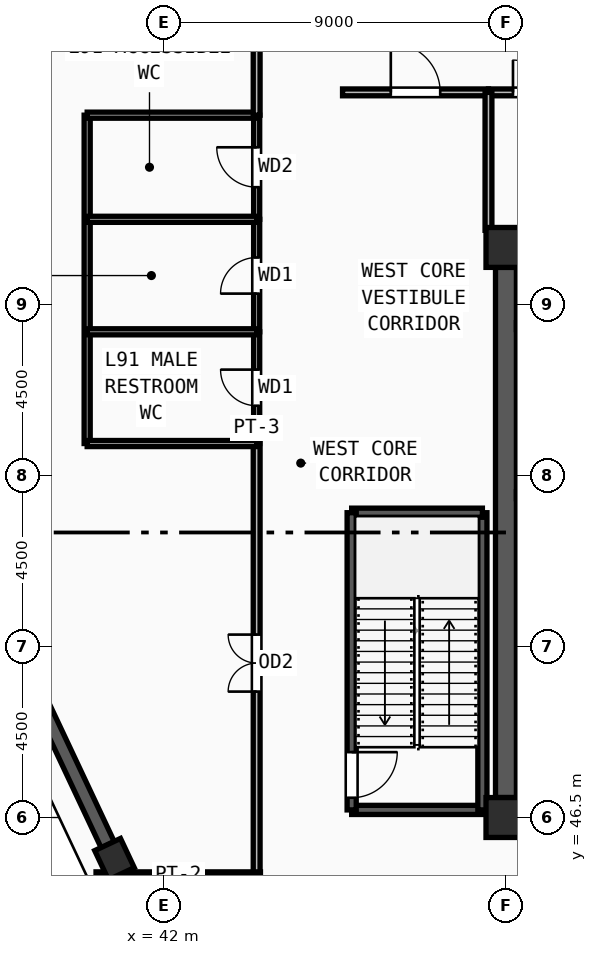
"""IFC4 building model, lengths in metres.
Left out: names, types, materials, properties, quantities, classifications, styles, units other than length and angle.
Written with IfcOpenShell. Run it as: python <this file> out.ifc"""

import sys

from ifc_helpers import new_model, si_unit, direction, frame, frame_2d, origin, origin_2d, place, context, subcontext, project, spatial, rectangle, extrude, source, transform, mapped, element, fill, save


model = new_model("IFC4")
c1 = context("Model", 3, precision=1e-05, world=origin(), true_north=direction((0.0, 1.0)))
c2 = subcontext(c1, "Body", "Model", "MODEL_VIEW")
j1 = project(units=[si_unit("LENGTHUNIT", "METRE"), si_unit("PLANEANGLEUNIT", "RADIAN")], contexts=[c1])
p1 = place(None, origin())
s1 = spatial("IfcSite", under=j1, at=p1, CompositionType="ELEMENT")
p2 = place(p1, origin())
s2 = spatial("IfcBuilding", under=s1, at=p2, CompositionType="ELEMENT")
p3 = place(p2, frame((0.0, 0.0, 351.0)))
s3 = spatial("IfcBuildingStorey", under=s2, at=p3, CompositionType="ELEMENT", Elevation=351.0)
m1 = source(origin(), c2, "Body", "SweptSolid", [
    extrude(rectangle(XDim=1.05, YDim=1.05, at=origin_2d()), origin(), (0.0, 0.0, 1.0), 4.8),
])
for number, where, z_axis, x_axis in (
    (1, (51.0, 46.5, 0.0), (0.0, 0.0, 1.0), (1.0, 0.0, 0.0)),
    (2, (51.0, 61.5, 0.0), (0.0, 0.0, 1.0), (1.0, 0.0, 0.0)),
):
    element("IfcColumn", number, at=place(p3, frame(where, z_axis=z_axis, x_axis=x_axis)), inside=s3, PredefinedType="COLUMN", context=c2, shape_type="MappedRepresentation", body=[
        mapped(m1, transform((0.0, 0.0, 0.0), x_axis=(1.0, 0.0, 0.0), y_axis=(0.0, 1.0, 0.0), z_axis=(0.0, 0.0, 1.0), scale=1.0)),
    ])
m2 = source(origin(), c2, "Body", "SweptSolid", [
    extrude(rectangle(XDim=0.85, YDim=0.75, at=origin_2d()), origin(), (0.0, 0.0, 1.0), 4.8),
])
p4 = place(p3, frame((40.699, 45.405, 0.0), z_axis=(0.0, 0.0, 1.0), x_axis=(-0.425937207192, 0.90475272618, 0.0)))
e3 = element("IfcColumn", 3, at=p4, inside=s3, PredefinedType="COLUMN", context=c2, shape_type="MappedRepresentation", body=[
    mapped(m2, transform((0.0, 0.0, 0.0), x_axis=(1.0, 0.0, 0.0), y_axis=(0.0, 1.0, 0.0), z_axis=(0.0, 0.0, 1.0), scale=1.0)),
])
p5 = place(p3, frame((38.526, 50.02, 0.0), z_axis=(0.0, 0.0, 1.0), x_axis=(0.425937528266, -0.904752575025, 0.0)))
e4 = element("IfcWall", 4, at=p5, inside=s3, PredefinedType="SOLIDWALL", context=c2, shape_type="SweptSolid", body=[
    extrude(rectangle(XDim=4.686, YDim=0.38, at=frame_2d((2.343, 0.0))), origin(), (0.0, 0.0, 1.0), 4.52),
])
p6 = place(p3, frame((40.931, 45.061, 0.0), z_axis=(0.0, 0.0, 1.0), x_axis=(0.559190389006, -0.829039268578, 0.0)))
e5 = element("IfcWall", 5, at=p6, inside=s3, PredefinedType="SOLIDWALL", context=c2, shape_type="SweptSolid", body=[
    extrude(rectangle(XDim=6.889, YDim=0.38, at=frame_2d((3.444, 0.0))), origin(), (0.0, 0.0, 1.0), 4.52),
])
p7 = place(p3, frame((51.0, 47.025, 0.0), z_axis=(0.0, 0.0, 1.0), x_axis=(0.0, 1.0, 0.0)))
e6 = element("IfcWall", 6, at=p7, inside=s3, PredefinedType="SHEAR", context=c2, shape_type="SweptSolid", body=[
    extrude(rectangle(XDim=13.95, YDim=0.55, at=frame_2d((6.975, 0.0))), origin(), (0.0, 0.0, 1.0), 4.52),
])
p8 = place(p3, frame((46.94, 46.7, 0.0), z_axis=(0.0, 0.0, 1.0), x_axis=(1.0, 0.0, 0.0)))
e7 = element("IfcWall", 7, at=p8, inside=s3, PredefinedType="SOLIDWALL", context=c2, shape_type="SweptSolid", body=[
    extrude(rectangle(XDim=3.44, YDim=0.24, at=frame_2d((1.72, 0.0))), origin(), (0.0, 0.0, 1.0), 4.52),
])
p9 = place(p3, frame((50.38, 46.7, 0.0), z_axis=(0.0, 0.0, 1.0), x_axis=(0.0, 1.0, 0.0)))
e8 = element("IfcWall", 8, at=p9, inside=s3, PredefinedType="SOLIDWALL", context=c2, shape_type="SweptSolid", body=[
    extrude(rectangle(XDim=7.82, YDim=0.24, at=frame_2d((3.91, 0.0))), origin(), (0.0, 0.0, 1.0), 4.52),
])
p10 = place(p3, frame((50.38, 54.52, 0.0), z_axis=(0.0, 0.0, 1.0), x_axis=(-1.0, 0.0, 0.0)))
e9 = element("IfcWall", 9, at=p10, inside=s3, PredefinedType="SOLIDWALL", context=c2, shape_type="SweptSolid", body=[
    extrude(rectangle(XDim=3.44, YDim=0.24, at=frame_2d((1.72, 0.0))), origin(), (0.0, 0.0, 1.0), 4.52),
])
p11 = place(p3, frame((46.94, 54.52, 0.0), z_axis=(0.0, 0.0, 1.0), x_axis=(0.0, -1.0, 0.0)))
e10 = element("IfcWall", 10, at=p11, inside=s3, PredefinedType="SOLIDWALL", context=c2, shape_type="SweptSolid", body=[
    extrude(rectangle(XDim=7.82, YDim=0.24, at=frame_2d((3.91, 0.0))), origin(), (0.0, 0.0, 1.0), 4.52),
])
m3 = source(origin(), c2, "Body", "SweptSolid", [
    extrude(rectangle(XDim=1.2, YDim=2.2, at=frame_2d((0.6, 1.1))), frame((0.0, 0.13, 0.0), z_axis=(0.0, -1.0, 0.0), x_axis=(1.0, 0.0, 0.0)), (0.0, 0.0, 1.0), 0.26),
])
p12 = place(p11, frame((6.3, 0.0, 0.0)))
e11 = element("IfcOpeningElement", 11, at=p12, cuts=e10, PredefinedType="OPENING", context=c2, shape_type="MappedRepresentation", body=[
    mapped(m3, transform((0.0, 0.0, 0.0), x_axis=(1.0, 0.0, 0.0), y_axis=(0.0, 1.0, 0.0), z_axis=(0.0, 0.0, 1.0), scale=1.0)),
])
p13 = place(p3, frame((51.275, 54.98, 0.0), z_axis=(0.0, 0.0, 1.0), x_axis=(1.0, 0.0, 0.0)))
e12 = element("IfcWall", 12, at=p13, inside=s3, PredefinedType="PARTITIONING", context=c2, shape_type="SweptSolid", body=[
    extrude(rectangle(XDim=2.485, YDim=0.18, at=frame_2d((1.243, 0.0))), origin(), (0.0, 0.0, 1.0), 4.52),
])
m4 = source(origin(), c2, "Body", "SweptSolid", [
    extrude(rectangle(XDim=0.85, YDim=2.1, at=frame_2d((0.425, 1.05))), frame((0.0, 0.1, 0.0), z_axis=(0.0, -1.0, 0.0), x_axis=(1.0, 0.0, 0.0)), (0.0, 0.0, 1.0), 0.2),
])
p14 = place(p13, frame((0.915, 0.0, 0.0)))
e13 = element("IfcOpeningElement", 13, at=p14, cuts=e12, PredefinedType="OPENING", context=c2, shape_type="MappedRepresentation", body=[
    mapped(m4, transform((0.0, 0.0, 0.0), x_axis=(1.0, 0.0, 0.0), y_axis=(0.0, 1.0, 0.0), z_axis=(0.0, 0.0, 1.0), scale=1.0)),
])
p15 = place(p3, frame((44.44, 56.34, 0.0), z_axis=(0.0, 0.0, 1.0), x_axis=(0.0, 1.0, 0.0)))
e14 = element("IfcWall", 14, at=p15, inside=s3, PredefinedType="PARTITIONING", context=c2, shape_type="SweptSolid", body=[
    extrude(rectangle(XDim=2.94, YDim=0.16, at=frame_2d((1.47, 0.0))), origin(), (0.0, 0.0, 1.0), 4.52),
])
m5 = source(origin(), c2, "Body", "SweptSolid", [
    extrude(rectangle(XDim=0.95, YDim=2.15, at=frame_2d((0.475, 1.075))), frame((0.0, 0.09, 0.0), z_axis=(0.0, -1.0, 0.0), x_axis=(1.0, 0.0, 0.0)), (0.0, 0.0, 1.0), 0.18),
])
p16 = place(p15, frame((0.995, 0.0, 0.0)))
e15 = element("IfcOpeningElement", 15, at=p16, cuts=e14, PredefinedType="OPENING", context=c2, shape_type="MappedRepresentation", body=[
    mapped(m5, transform((0.0, 0.0, 0.0), x_axis=(1.0, 0.0, 0.0), y_axis=(0.0, 1.0, 0.0), z_axis=(0.0, 0.0, 1.0), scale=1.0)),
])
p17 = place(p3, frame((44.44, 59.28, 0.0), z_axis=(0.0, 0.0, 1.0), x_axis=(0.0, 1.0, 0.0)))
e16 = element("IfcWall", 16, at=p17, inside=s3, PredefinedType="PARTITIONING", context=c2, shape_type="SweptSolid", body=[
    extrude(rectangle(XDim=2.96, YDim=0.16, at=frame_2d((1.48, 0.0))), origin(), (0.0, 0.0, 1.0), 4.52),
])
p18 = place(p17, frame((1.005, 0.0, 0.0)))
e17 = element("IfcOpeningElement", 17, at=p18, cuts=e16, PredefinedType="OPENING", context=c2, shape_type="MappedRepresentation", body=[
    mapped(m5, transform((0.0, 0.0, 0.0), x_axis=(1.0, 0.0, 0.0), y_axis=(0.0, 1.0, 0.0), z_axis=(0.0, 0.0, 1.0), scale=1.0)),
])
p19 = place(p3, frame((44.44, 62.24, 0.0), z_axis=(0.0, 0.0, 1.0), x_axis=(0.0, 1.0, 0.0)))
e18 = element("IfcWall", 18, at=p19, inside=s3, PredefinedType="PARTITIONING", context=c2, shape_type="SweptSolid", body=[
    extrude(rectangle(XDim=2.74, YDim=0.16, at=frame_2d((1.37, 0.0))), origin(), (0.0, 0.0, 1.0), 4.52),
])
m6 = source(origin(), c2, "Body", "SweptSolid", [
    extrude(rectangle(XDim=1.05, YDim=2.15, at=frame_2d((0.525, 1.075))), frame((0.0, 0.09, 0.0), z_axis=(0.0, -1.0, 0.0), x_axis=(1.0, 0.0, 0.0)), (0.0, 0.0, 1.0), 0.18),
])
p20 = place(p19, frame((0.845, 0.0, 0.0)))
e19 = element("IfcOpeningElement", 19, at=p20, cuts=e18, PredefinedType="OPENING", context=c2, shape_type="MappedRepresentation", body=[
    mapped(m6, transform((0.0, 0.0, 0.0), x_axis=(1.0, 0.0, 0.0), y_axis=(0.0, 1.0, 0.0), z_axis=(0.0, 0.0, 1.0), scale=1.0)),
])
p21 = place(p3, frame((50.54, 65.58, 0.0), z_axis=(0.0, 0.0, 1.0), x_axis=(1.0, 0.0, 0.0)))
e20 = element("IfcWall", 20, at=p21, inside=s3, PredefinedType="PARTITIONING", context=c2, shape_type="SweptSolid", body=[
    extrude(rectangle(XDim=2.14, YDim=0.18, at=frame_2d((1.07, 0.0))), origin(), (0.0, 0.0, 1.0), 4.52),
])
p22 = place(p21, frame((0.645, 0.0, 0.0)))
e21 = element("IfcOpeningElement", 21, at=p22, cuts=e20, PredefinedType="OPENING", context=c2, shape_type="MappedRepresentation", body=[
    mapped(m4, transform((0.0, 0.0, 0.0), x_axis=(1.0, 0.0, 0.0), y_axis=(0.0, 1.0, 0.0), z_axis=(0.0, 0.0, 1.0), scale=1.0)),
])
p23 = place(p3, frame((46.7, 65.58, 0.0), z_axis=(0.0, 0.0, 1.0), x_axis=(1.0, 0.0, 0.0)))
e22 = element("IfcWall", 22, at=p23, inside=s3, PredefinedType="PARTITIONING", context=c2, shape_type="SweptSolid", body=[
    extrude(rectangle(XDim=3.84, YDim=0.18, at=frame_2d((1.92, 0.0))), origin(), (0.0, 0.0, 1.0), 4.52),
])
m7 = source(origin(), c2, "Body", "SweptSolid", [
    extrude(rectangle(XDim=1.3, YDim=2.2, at=frame_2d((0.65, 1.1))), frame((0.0, 0.1, 0.0), z_axis=(0.0, -1.0, 0.0), x_axis=(1.0, 0.0, 0.0)), (0.0, 0.0, 1.0), 0.2),
])
p24 = place(p23, frame((1.27, 0.0, 0.0)))
e23 = element("IfcOpeningElement", 23, at=p24, cuts=e22, PredefinedType="OPENING", context=c2, shape_type="MappedRepresentation", body=[
    mapped(m7, transform((0.0, 0.0, 0.0), x_axis=(1.0, 0.0, 0.0), y_axis=(0.0, 1.0, 0.0), z_axis=(0.0, 0.0, 1.0), scale=1.0)),
])
p25 = place(p3, frame((44.44, 44.785, 0.0), z_axis=(0.0, 0.0, 1.0), x_axis=(0.0, 1.0, 0.0)))
e24 = element("IfcWall", 24, at=p25, inside=s3, PredefinedType="PARTITIONING", context=c2, shape_type="SweptSolid", body=[
    extrude(rectangle(XDim=11.555, YDim=0.18, at=frame_2d((5.778, 0.0))), origin(), (0.0, 0.0, 1.0), 4.155),
])
m8 = source(origin(), c2, "Body", "SweptSolid", [
    extrude(rectangle(XDim=1.5, YDim=2.2, at=frame_2d((0.75, 1.1))), frame((0.0, 0.1, 0.0), z_axis=(0.0, -1.0, 0.0), x_axis=(1.0, 0.0, 0.0)), (0.0, 0.0, 1.0), 0.2),
])
p26 = place(p25, frame((5.028, 0.0, 0.0)))
e25 = element("IfcOpeningElement", 25, at=p26, cuts=e24, PredefinedType="OPENING", context=c2, shape_type="MappedRepresentation", body=[
    mapped(m8, transform((0.0, 0.0, 0.0), x_axis=(1.0, 0.0, 0.0), y_axis=(0.0, 1.0, 0.0), z_axis=(0.0, 0.0, 1.0), scale=1.0)),
])
p27 = place(p3, frame((51.275, 59.43, 0.0), z_axis=(0.0, 0.0, 1.0), x_axis=(1.0, 0.0, 0.0)))
e26 = element("IfcWall", 26, at=p27, inside=s3, PredefinedType="PARTITIONING", context=c2, shape_type="SweptSolid", body=[
    extrude(rectangle(XDim=2.505, YDim=0.18, at=frame_2d((1.252, 0.0))), origin(), (0.0, 0.0, 1.0), 4.52),
])
p28 = place(p3, frame((39.98, 56.34, 0.0), z_axis=(0.0, 0.0, 1.0), x_axis=(0.0, 1.0, 0.0)))
e27 = element("IfcWall", 27, at=p28, inside=s3, PredefinedType="PARTITIONING", context=c2, shape_type="SweptSolid", body=[
    extrude(rectangle(XDim=8.64, YDim=0.16, at=frame_2d((4.32, 0.0))), origin(), (0.0, 0.0, 1.0), 4.52),
])
for number, where, z_axis, x_axis in (
    (28, (39.98, 56.34, 0.0), (0.0, 0.0, 1.0), (1.0, 0.0, 0.0)),
    (29, (39.98, 59.28, 0.0), (0.0, 0.0, 1.0), (1.0, 0.0, 0.0)),
    (30, (39.98, 62.24, 0.0), (0.0, 0.0, 1.0), (1.0, 0.0, 0.0)),
    (31, (39.98, 64.98, 0.0), (0.0, 0.0, 1.0), (1.0, 0.0, 0.0)),
):
    element("IfcWall", number, at=place(p3, frame(where, z_axis=z_axis, x_axis=x_axis)), inside=s3, PredefinedType="PARTITIONING", context=c2, shape_type="SweptSolid", body=[
        extrude(rectangle(XDim=4.46, YDim=0.16, at=frame_2d((2.23, 0.0))), origin(), (0.0, 0.0, 1.0), 4.52),
    ])
p29 = place(p3, frame((50.54, 61.95, 0.0), z_axis=(0.0, 0.0, 1.0), x_axis=(0.0, 1.0, 0.0)))
e32 = element("IfcWall", 32, at=p29, inside=s3, PredefinedType="PARTITIONING", context=c2, shape_type="SweptSolid", body=[
    extrude(rectangle(XDim=3.63, YDim=0.18, at=frame_2d((1.815, 0.0))), origin(), (0.0, 0.0, 1.0), 4.52),
])
p30 = place(p3, frame((44.44, 64.98, 0.0), z_axis=(0.0, 0.0, 1.0), x_axis=(0.0, 1.0, 0.0)))
e33 = element("IfcWall", 33, at=p30, inside=s3, PredefinedType="PARTITIONING", context=c2, shape_type="SweptSolid", body=[
    extrude(rectangle(XDim=3.0, YDim=0.18, at=frame_2d((1.5, 0.0))), origin(), (0.0, 0.0, 1.0), 4.52),
])
p31 = place(p3, frame((44.54, 45.0, 0.0), z_axis=(0.0, 0.0, 1.0), x_axis=(-1.0, 0.0, 0.0)))
e34 = element("IfcWall", 34, at=p31, inside=s3, PredefinedType="PARTITIONING", context=c2, shape_type="SweptSolid", body=[
    extrude(rectangle(XDim=4.327, YDim=0.14, at=frame_2d((2.164, 0.0))), origin(), (0.0, 0.0, 1.0), 4.52),
])
m9 = source(origin(), c2, "Body", "SweptSolid", [
    extrude(rectangle(XDim=1.2, YDim=2.2, at=frame_2d((0.6, 1.1))), frame((0.0, 0.025, 0.0), z_axis=(0.0, -1.0, 0.0), x_axis=(1.0, 0.0, 0.0)), (0.0, 0.0, 1.0), 0.05),
])
p32 = place(p12, origin())
e35 = element("IfcDoor", 35, at=p32, inside=s3, OperationType="SINGLE_SWING_LEFT", PredefinedType="DOOR", context=c2, shape_type="MappedRepresentation", body=[
    mapped(m9, transform((0.0, 0.0, 0.0), x_axis=(1.0, 0.0, 0.0), y_axis=(0.0, 1.0, 0.0), z_axis=(0.0, 0.0, 1.0), scale=1.0)),
])
fill(e11, e35)
m10 = source(origin(), c2, "Body", "SweptSolid", [
    extrude(rectangle(XDim=0.95, YDim=2.15, at=frame_2d((0.475, 1.075))), frame((0.0, 0.025, 0.0), z_axis=(0.0, -1.0, 0.0), x_axis=(1.0, 0.0, 0.0)), (0.0, 0.0, 1.0), 0.05),
])
p33 = place(p16, origin())
e36 = element("IfcDoor", 36, at=p33, inside=s3, OperationType="SINGLE_SWING_RIGHT", PredefinedType="DOOR", context=c2, shape_type="MappedRepresentation", body=[
    mapped(m10, transform((0.0, 0.0, 0.0), x_axis=(1.0, 0.0, 0.0), y_axis=(0.0, 1.0, 0.0), z_axis=(0.0, 0.0, 1.0), scale=1.0)),
])
fill(e15, e36)
p34 = place(p18, origin())
e37 = element("IfcDoor", 37, at=p34, inside=s3, OperationType="SINGLE_SWING_LEFT", PredefinedType="DOOR", context=c2, shape_type="MappedRepresentation", body=[
    mapped(m10, transform((0.0, 0.0, 0.0), x_axis=(1.0, 0.0, 0.0), y_axis=(0.0, 1.0, 0.0), z_axis=(0.0, 0.0, 1.0), scale=1.0)),
])
fill(e17, e37)
m11 = source(origin(), c2, "Body", "SweptSolid", [
    extrude(rectangle(XDim=1.05, YDim=2.15, at=frame_2d((0.525, 1.075))), frame((0.0, 0.025, 0.0), z_axis=(0.0, -1.0, 0.0), x_axis=(1.0, 0.0, 0.0)), (0.0, 0.0, 1.0), 0.05),
])
p35 = place(p20, origin())
e38 = element("IfcDoor", 38, at=p35, inside=s3, OperationType="SINGLE_SWING_RIGHT", PredefinedType="DOOR", context=c2, shape_type="MappedRepresentation", body=[
    mapped(m11, transform((0.0, 0.0, 0.0), x_axis=(1.0, 0.0, 0.0), y_axis=(0.0, 1.0, 0.0), z_axis=(0.0, 0.0, 1.0), scale=1.0)),
])
fill(e19, e38)
m12 = source(origin(), c2, "Body", "SweptSolid", [
    extrude(rectangle(XDim=0.85, YDim=2.1, at=frame_2d((0.425, 1.05))), frame((0.0, 0.025, 0.0), z_axis=(0.0, -1.0, 0.0), x_axis=(1.0, 0.0, 0.0)), (0.0, 0.0, 1.0), 0.05),
])
p36 = place(p22, origin())
e39 = element("IfcDoor", 39, at=p36, inside=s3, OperationType="SINGLE_SWING_LEFT", PredefinedType="DOOR", context=c2, shape_type="MappedRepresentation", body=[
    mapped(m12, transform((0.0, 0.0, 0.0), x_axis=(1.0, 0.0, 0.0), y_axis=(0.0, 1.0, 0.0), z_axis=(0.0, 0.0, 1.0), scale=1.0)),
])
fill(e21, e39)
m13 = source(origin(), c2, "Body", "SweptSolid", [
    extrude(rectangle(XDim=1.3, YDim=2.2, at=frame_2d((0.65, 1.1))), frame((0.0, 0.025, 0.0), z_axis=(0.0, -1.0, 0.0), x_axis=(1.0, 0.0, 0.0)), (0.0, 0.0, 1.0), 0.05),
])
p37 = place(p24, origin())
e40 = element("IfcDoor", 40, at=p37, inside=s3, OperationType="SINGLE_SWING_LEFT", PredefinedType="DOOR", context=c2, shape_type="MappedRepresentation", body=[
    mapped(m13, transform((0.0, 0.0, 0.0), x_axis=(1.0, 0.0, 0.0), y_axis=(0.0, 1.0, 0.0), z_axis=(0.0, 0.0, 1.0), scale=1.0)),
])
fill(e23, e40)
m14 = source(origin(), c2, "Body", "SweptSolid", [
    extrude(rectangle(XDim=1.5, YDim=2.2, at=frame_2d((0.75, 1.1))), frame((0.0, 0.025, 0.0), z_axis=(0.0, -1.0, 0.0), x_axis=(1.0, 0.0, 0.0)), (0.0, 0.0, 1.0), 0.05),
])
p38 = place(p26, origin())
e41 = element("IfcDoor", 41, at=p38, inside=s3, OperationType="DOUBLE_DOOR_SINGLE_SWING", PredefinedType="DOOR", context=c2, shape_type="MappedRepresentation", body=[
    mapped(m14, transform((0.0, 0.0, 0.0), x_axis=(1.0, 0.0, 0.0), y_axis=(0.0, 1.0, 0.0), z_axis=(0.0, 0.0, 1.0), scale=1.0)),
])
fill(e25, e41)
save(model, sys.argv[1])
